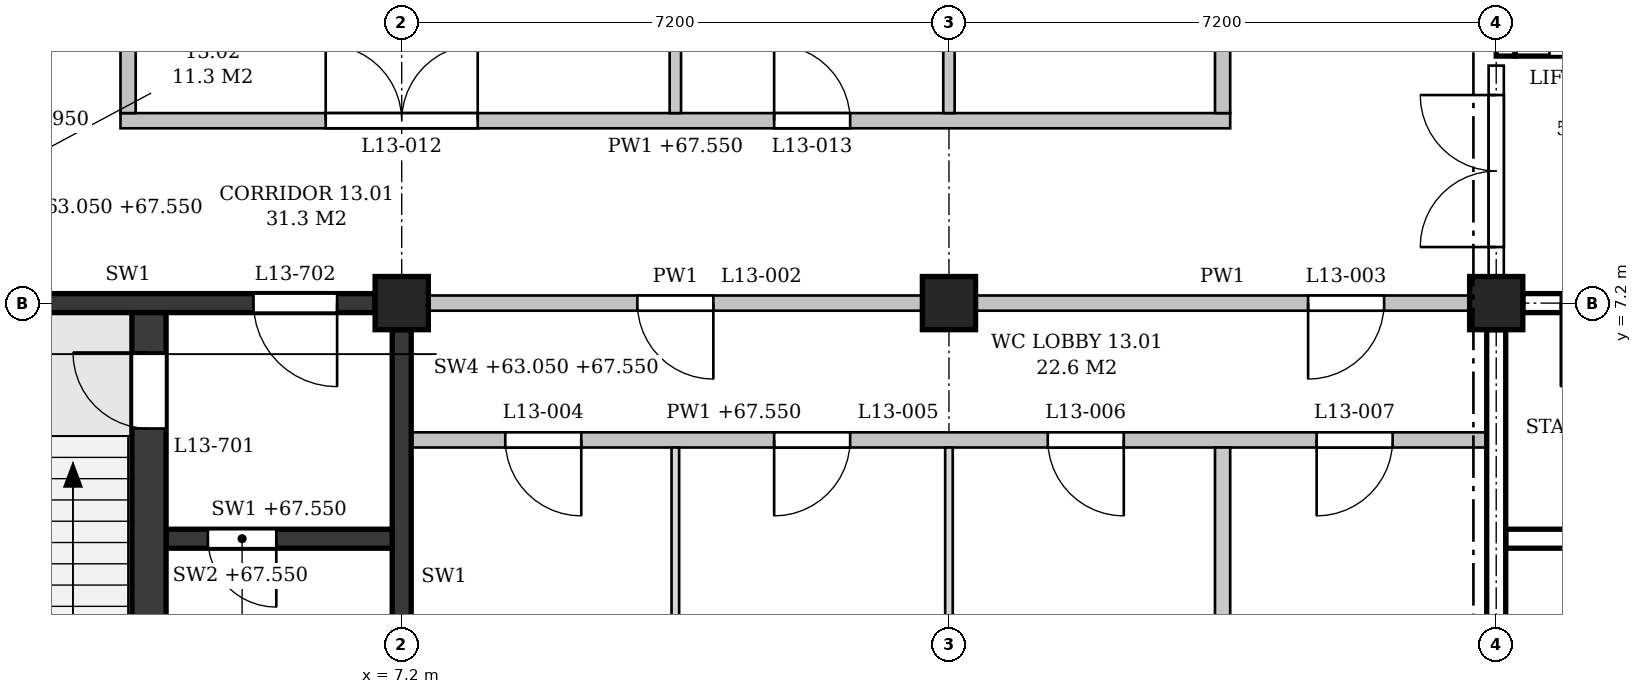
"""IFC4 building model, lengths in metres.
Left out: names, types, materials, properties, quantities, classifications, styles, units other than length and angle.
Written with IfcOpenShell. Run it as: python <this file> out.ifc"""

import sys

from ifc_helpers import new_model, si_unit, direction, frame, frame_2d, origin, origin_2d, place, context, subcontext, project, spatial, polyline, rectangle, outline, extrude, element, fill, save


model = new_model("IFC4")
c1 = context("Model", 3, precision=1e-05, world=origin(), true_north=direction((0.0, 1.0)))
c2 = subcontext(c1, "Body", "Model", "MODEL_VIEW")
j1 = project(units=[si_unit("LENGTHUNIT", "METRE"), si_unit("PLANEANGLEUNIT", "RADIAN")], contexts=[c1])
p1 = place(None, origin())
s1 = spatial("IfcSite", under=j1, at=p1, CompositionType="ELEMENT")
p2 = place(p1, origin())
s2 = spatial("IfcBuilding", under=s1, at=p2, CompositionType="ELEMENT")
p3 = place(p2, frame((0.0, 0.0, 63.3)))
s3 = spatial("IfcBuildingStorey", under=s2, at=p3, CompositionType="ELEMENT", Elevation=63.3)
for number, where, z_axis, x_axis in (
    (1, (7.2, 7.2, 0.0), (0.0, 0.0, 1.0), (1.0, 0.0, 0.0)),
    (2, (14.4, 7.2, 0.0), (0.0, 0.0, 1.0), (1.0, 0.0, 0.0)),
    (3, (21.6, 7.2, 0.0), (0.0, 0.0, 1.0), (1.0, 0.0, 0.0)),
):
    element("IfcColumn", number, at=place(p3, frame(where, z_axis=z_axis, x_axis=x_axis)), inside=s3, PredefinedType="COLUMN", context=c2, shape_type="SweptSolid", body=[
        extrude(rectangle(XDim=0.7, YDim=0.7, at=origin_2d()), origin(), (0.0, 0.0, 1.0), 4.5),
    ])
p4 = place(p3, frame((0.35, 7.2, 0.0), z_axis=(0.0, 0.0, 1.0), x_axis=(1.0, 0.0, 0.0)))
e4 = element("IfcWall", 4, at=p4, inside=s3, PredefinedType="SHEAR", context=c2, shape_type="SweptSolid", body=[
    extrude(rectangle(XDim=6.5, YDim=0.25, at=frame_2d((3.25, 0.0))), origin(), (0.0, 0.0, 1.0), 3.6),
])
p5 = place(p4, frame((4.9, 0.0, 0.0)))
e5 = element("IfcOpeningElement", 5, at=p5, cuts=e4, PredefinedType="OPENING", context=c2, shape_type="SweptSolid", body=[
    extrude(rectangle(XDim=1.1, YDim=2.1, at=frame_2d((0.55, 1.05))), frame((0.0, 0.135, 0.0), z_axis=(0.0, -1.0, 0.0), x_axis=(1.0, 0.0, 0.0)), (0.0, 0.0, 1.0), 0.27),
])
p6 = place(p3, frame((7.2, 0.35, 0.0), z_axis=(0.0, 0.0, 1.0), x_axis=(0.0, 1.0, 0.0)))
e6 = element("IfcWall", 6, at=p6, inside=s3, PredefinedType="SHEAR", context=c2, shape_type="SweptSolid", body=[
    extrude(rectangle(XDim=6.5, YDim=0.25, at=frame_2d((3.25, 0.0))), origin(), (0.0, 0.0, 1.0), 3.6),
])
p7 = place(p3, frame((3.875, 0.15, 0.0), z_axis=(0.0, 0.0, 1.0), x_axis=(0.0, 1.0, 0.0)))
e7 = element("IfcWall", 7, at=p7, inside=s3, PredefinedType="SHEAR", context=c2, shape_type="SweptSolid", body=[
    extrude(rectangle(XDim=6.925, YDim=0.45, at=frame_2d((3.462, 0.0))), origin(), (0.0, 0.0, 1.0), 4.25),
])
p8 = place(p7, frame((5.4, 0.0, 0.0)))
e8 = element("IfcOpeningElement", 8, at=p8, cuts=e7, PredefinedType="OPENING", context=c2, shape_type="SweptSolid", body=[
    extrude(rectangle(XDim=1.0, YDim=2.1, at=frame_2d((0.5, 1.05))), frame((0.0, 0.235, 0.0), z_axis=(0.0, -1.0, 0.0), x_axis=(1.0, 0.0, 0.0)), (0.0, 0.0, 1.0), 0.47),
])
p9 = place(p3, frame((4.1, 4.1, 0.0), z_axis=(0.0, 0.0, 1.0), x_axis=(1.0, 0.0, 0.0)))
e9 = element("IfcWall", 9, at=p9, inside=s3, PredefinedType="SHEAR", context=c2, shape_type="SweptSolid", body=[
    extrude(rectangle(XDim=2.975, YDim=0.25, at=frame_2d((1.487, 0.0))), origin(), (0.0, 0.0, 1.0), 4.25),
])
p10 = place(p9, frame((0.55, 0.0, 0.0)))
e10 = element("IfcOpeningElement", 10, at=p10, cuts=e9, PredefinedType="OPENING", context=c2, shape_type="SweptSolid", body=[
    extrude(rectangle(XDim=0.9, YDim=2.1, at=frame_2d((0.45, 1.05))), frame((0.0, 0.135, 0.0), z_axis=(0.0, -1.0, 0.0), x_axis=(1.0, 0.0, 0.0)), (0.0, 0.0, 1.0), 0.27),
])
p11 = place(p3, frame((21.95, 7.2, 0.0), z_axis=(0.0, 0.0, 1.0), x_axis=(1.0, 0.0, 0.0)))
e11 = element("IfcWall", 11, at=p11, inside=s3, PredefinedType="SHEAR", context=c2, shape_type="SweptSolid", body=[
    extrude(rectangle(XDim=6.5, YDim=0.25, at=frame_2d((3.25, 0.0))), origin(), (0.0, 0.0, 1.0), 3.6),
])
p12 = place(p11, frame((0.5, 0.0, 0.0)))
e12 = element("IfcOpeningElement", 12, at=p12, cuts=e11, PredefinedType="OPENING", context=c2, shape_type="SweptSolid", body=[
    extrude(rectangle(XDim=1.1, YDim=2.1, at=frame_2d((0.55, 1.05))), frame((0.0, 0.135, 0.0), z_axis=(0.0, -1.0, 0.0), x_axis=(1.0, 0.0, 0.0)), (0.0, 0.0, 1.0), 0.27),
])
p13 = place(p3, frame((21.6, 0.35, 0.0), z_axis=(0.0, 0.0, 1.0), x_axis=(0.0, 1.0, 0.0)))
e13 = element("IfcWall", 13, at=p13, inside=s3, PredefinedType="SHEAR", context=c2, shape_type="SweptSolid", body=[
    extrude(rectangle(XDim=6.5, YDim=0.25, at=frame_2d((3.25, 0.0))), origin(), (0.0, 0.0, 1.0), 3.6),
])
p14 = place(p3, frame((21.725, 4.1, 0.0), z_axis=(0.0, 0.0, 1.0), x_axis=(1.0, 0.0, 0.0)))
e14 = element("IfcWall", 14, at=p14, inside=s3, PredefinedType="SHEAR", context=c2, shape_type="SweptSolid", body=[
    extrude(rectangle(XDim=2.975, YDim=0.25, at=frame_2d((1.487, 0.0))), origin(), (0.0, 0.0, 1.0), 4.25),
])
p15 = place(p14, frame((1.525, 0.0, 0.0)))
e15 = element("IfcOpeningElement", 15, at=p15, cuts=e14, PredefinedType="OPENING", context=c2, shape_type="SweptSolid", body=[
    extrude(rectangle(XDim=0.9, YDim=2.1, at=frame_2d((0.45, 1.05))), frame((0.0, 0.135, 0.0), z_axis=(0.0, -1.0, 0.0), x_axis=(1.0, 0.0, 0.0)), (0.0, 0.0, 1.0), 0.27),
])
p16 = place(p3, frame((21.725, 10.45, -0.25), z_axis=(0.0, 0.0, 1.0), x_axis=(0.0, 1.0, 0.0)))
e16 = element("IfcWall", 16, at=p16, inside=s3, PredefinedType="SHEAR", context=c2, shape_type="SweptSolid", body=[
    extrude(rectangle(XDim=3.6, YDim=0.25, at=frame_2d((1.8, 0.0))), origin(), (0.0, 0.0, 1.0), 3.85),
])
p17 = place(p3, frame((21.85, 10.575, -0.25), z_axis=(0.0, 0.0, 1.0), x_axis=(1.0, 0.0, 0.0)))
e17 = element("IfcWall", 17, at=p17, inside=s3, PredefinedType="SHEAR", context=c2, shape_type="SweptSolid", body=[
    extrude(rectangle(XDim=2.0, YDim=0.25, at=frame_2d((1.0, 0.0))), origin(), (0.0, 0.0, 1.0), 4.5),
])
p18 = place(p17, frame((0.45, 0.0, 0.25)))
e18 = element("IfcOpeningElement", 18, at=p18, cuts=e17, PredefinedType="OPENING", context=c2, shape_type="SweptSolid", body=[
    extrude(rectangle(XDim=1.1, YDim=2.1, at=frame_2d((0.55, 1.05))), frame((0.0, 0.135, 0.0), z_axis=(0.0, -1.0, 0.0), x_axis=(1.0, 0.0, 0.0)), (0.0, 0.0, 1.0), 0.27),
])
p19 = place(p3, frame((7.325, 5.4, 0.0), z_axis=(0.0, 0.0, 1.0), x_axis=(1.0, 0.0, 0.0)))
e19 = element("IfcWall", 19, at=p19, inside=s3, PredefinedType="PARTITIONING", context=c2, shape_type="SweptSolid", body=[
    extrude(outline(polyline([(0.0, 0.0), (14.15, 0.0), (14.15, 3.6), (14.075, 3.6), (14.075, 4.25), (7.275, 4.25), (7.275, 3.6), (6.875, 3.6), (6.875, 4.25), (0.075, 4.25), (0.075, 3.6), (0.0, 3.6), (0.0, 0.0)])), frame((0.0, 0.1, 0.0), z_axis=(0.0, -1.0, 0.0), x_axis=(1.0, 0.0, 0.0)), (0.0, 0.0, 1.0), 0.2),
])
p20 = place(p19, frame((1.238, 0.0, 0.0)))
e20 = element("IfcOpeningElement", 20, at=p20, cuts=e19, PredefinedType="OPENING", context=c2, shape_type="SweptSolid", body=[
    extrude(rectangle(XDim=1.0, YDim=2.1, at=frame_2d((0.5, 1.05))), frame((0.0, 0.11, 0.0), z_axis=(0.0, -1.0, 0.0), x_axis=(1.0, 0.0, 0.0)), (0.0, 0.0, 1.0), 0.22),
])
p21 = place(p19, frame((4.775, 0.0, 0.0)))
e21 = element("IfcOpeningElement", 21, at=p21, cuts=e19, PredefinedType="OPENING", context=c2, shape_type="SweptSolid", body=[
    extrude(rectangle(XDim=1.0, YDim=2.1, at=frame_2d((0.5, 1.05))), frame((0.0, 0.11, 0.0), z_axis=(0.0, -1.0, 0.0), x_axis=(1.0, 0.0, 0.0)), (0.0, 0.0, 1.0), 0.22),
])
p22 = place(p19, frame((8.375, 0.0, 0.0)))
e22 = element("IfcOpeningElement", 22, at=p22, cuts=e19, PredefinedType="OPENING", context=c2, shape_type="SweptSolid", body=[
    extrude(rectangle(XDim=1.0, YDim=2.1, at=frame_2d((0.5, 1.05))), frame((0.0, 0.11, 0.0), z_axis=(0.0, -1.0, 0.0), x_axis=(1.0, 0.0, 0.0)), (0.0, 0.0, 1.0), 0.22),
])
p23 = place(p19, frame((11.913, 0.0, 0.0)))
e23 = element("IfcOpeningElement", 23, at=p23, cuts=e19, PredefinedType="OPENING", context=c2, shape_type="SweptSolid", body=[
    extrude(rectangle(XDim=1.0, YDim=2.1, at=frame_2d((0.5, 1.05))), frame((0.0, 0.11, 0.0), z_axis=(0.0, -1.0, 0.0), x_axis=(1.0, 0.0, 0.0)), (0.0, 0.0, 1.0), 0.22),
])
p24 = place(p3, frame((7.55, 7.2, 0.0), z_axis=(0.0, 0.0, 1.0), x_axis=(1.0, 0.0, 0.0)))
e24 = element("IfcWall", 24, at=p24, inside=s3, PredefinedType="PARTITIONING", context=c2, shape_type="SweptSolid", body=[
    extrude(rectangle(XDim=6.5, YDim=0.2, at=frame_2d((3.25, 0.0))), origin(), (0.0, 0.0, 1.0), 3.6),
])
p25 = place(p24, frame((2.75, 0.0, 0.0)))
e25 = element("IfcOpeningElement", 25, at=p25, cuts=e24, PredefinedType="OPENING", context=c2, shape_type="SweptSolid", body=[
    extrude(rectangle(XDim=1.0, YDim=2.1, at=frame_2d((0.5, 1.05))), frame((0.0, 0.11, 0.0), z_axis=(0.0, -1.0, 0.0), x_axis=(1.0, 0.0, 0.0)), (0.0, 0.0, 1.0), 0.22),
])
p26 = place(p3, frame((14.75, 7.2, 0.0), z_axis=(0.0, 0.0, 1.0), x_axis=(1.0, 0.0, 0.0)))
e26 = element("IfcWall", 26, at=p26, inside=s3, PredefinedType="PARTITIONING", context=c2, shape_type="SweptSolid", body=[
    extrude(rectangle(XDim=6.5, YDim=0.2, at=frame_2d((3.25, 0.0))), origin(), (0.0, 0.0, 1.0), 3.6),
])
p27 = place(p26, frame((4.375, 0.0, 0.0)))
e27 = element("IfcOpeningElement", 27, at=p27, cuts=e26, PredefinedType="OPENING", context=c2, shape_type="SweptSolid", body=[
    extrude(rectangle(XDim=1.0, YDim=2.1, at=frame_2d((0.5, 1.05))), frame((0.0, 0.11, 0.0), z_axis=(0.0, -1.0, 0.0), x_axis=(1.0, 0.0, 0.0)), (0.0, 0.0, 1.0), 0.22),
])
p28 = place(p3, frame((3.5, 9.6, 0.0), z_axis=(0.0, 0.0, 1.0), x_axis=(1.0, 0.0, 0.0)))
e28 = element("IfcWall", 28, at=p28, inside=s3, PredefinedType="PARTITIONING", context=c2, shape_type="SweptSolid", body=[
    extrude(outline(polyline([(0.0, 0.0), (14.6, 0.0), (14.6, 4.25), (11.1, 4.25), (11.1, 3.6), (10.7, 3.6), (10.7, 4.25), (3.9, 4.25), (3.9, 3.6), (3.5, 3.6), (3.5, 4.25), (0.0, 4.25), (0.0, 0.0)])), frame((0.0, 0.1, 0.0), z_axis=(0.0, -1.0, 0.0), x_axis=(1.0, 0.0, 0.0)), (0.0, 0.0, 1.0), 0.2),
])
p29 = place(p28, frame((2.7, 0.0, 0.0)))
e29 = element("IfcOpeningElement", 29, at=p29, cuts=e28, PredefinedType="OPENING", context=c2, shape_type="SweptSolid", body=[
    extrude(rectangle(XDim=2.0, YDim=2.1, at=frame_2d((1.0, 1.05))), frame((0.0, 0.11, 0.0), z_axis=(0.0, -1.0, 0.0), x_axis=(1.0, 0.0, 0.0)), (0.0, 0.0, 1.0), 0.22),
])
p30 = place(p28, frame((8.6, 0.0, 0.0)))
e30 = element("IfcOpeningElement", 30, at=p30, cuts=e28, PredefinedType="OPENING", context=c2, shape_type="SweptSolid", body=[
    extrude(rectangle(XDim=1.0, YDim=2.1, at=frame_2d((0.5, 1.05))), frame((0.0, 0.11, 0.0), z_axis=(0.0, -1.0, 0.0), x_axis=(1.0, 0.0, 0.0)), (0.0, 0.0, 1.0), 0.22),
])
p31 = place(p3, frame((3.6, 9.7, 0.0), z_axis=(0.0, 0.0, 1.0), x_axis=(0.0, 1.0, 0.0)))
e31 = element("IfcWall", 31, at=p31, inside=s3, PredefinedType="PARTITIONING", context=c2, shape_type="SweptSolid", body=[
    extrude(rectangle(XDim=1.1, YDim=0.2, at=frame_2d((0.55, 0.0))), origin(), (0.0, 0.0, 1.0), 4.25),
])
p32 = place(p3, frame((10.8, 0.15, 0.0), z_axis=(0.0, 0.0, 1.0), x_axis=(0.0, 1.0, 0.0)))
e32 = element("IfcWall", 32, at=p32, inside=s3, PredefinedType="PARTITIONING", context=c2, shape_type="SweptSolid", body=[
    extrude(rectangle(XDim=5.15, YDim=0.1, at=frame_2d((2.575, 0.0))), origin(), (0.0, 0.0, 1.0), 3.6),
])
p33 = place(p3, frame((10.8, 9.7, 0.0), z_axis=(0.0, 0.0, 1.0), x_axis=(0.0, 1.0, 0.0)))
e33 = element("IfcWall", 33, at=p33, inside=s3, PredefinedType="PARTITIONING", context=c2, shape_type="SweptSolid", body=[
    extrude(rectangle(XDim=4.55, YDim=0.15, at=frame_2d((2.275, 0.0))), origin(), (0.0, 0.0, 1.0), 3.6),
])
p34 = place(p3, frame((14.4, 0.35, 0.0), z_axis=(0.0, 0.0, 1.0), x_axis=(0.0, 1.0, 0.0)))
e34 = element("IfcWall", 34, at=p34, inside=s3, PredefinedType="PARTITIONING", context=c2, shape_type="SweptSolid", body=[
    extrude(rectangle(XDim=4.95, YDim=0.1, at=frame_2d((2.475, 0.0))), origin(), (0.0, 0.0, 1.0), 3.6),
])
p35 = place(p3, frame((14.4, 9.7, 0.0), z_axis=(0.0, 0.0, 1.0), x_axis=(0.0, 1.0, 0.0)))
e35 = element("IfcWall", 35, at=p35, inside=s3, PredefinedType="PARTITIONING", context=c2, shape_type="SweptSolid", body=[
    extrude(rectangle(XDim=4.35, YDim=0.15, at=frame_2d((2.175, 0.0))), origin(), (0.0, 0.0, 1.0), 3.6),
])
p36 = place(p3, frame((18.0, 0.15, 0.0), z_axis=(0.0, 0.0, 1.0), x_axis=(0.0, 1.0, 0.0)))
e36 = element("IfcWall", 36, at=p36, inside=s3, PredefinedType="PARTITIONING", context=c2, shape_type="SweptSolid", body=[
    extrude(outline(polyline([(0.0, 0.0), (5.15, 0.0), (5.15, 4.25), (0.05, 4.25), (0.05, 3.65), (0.0, 3.65), (0.0, 0.0)])), frame((0.0, 0.1, 0.0), z_axis=(0.0, -1.0, 0.0), x_axis=(1.0, 0.0, 0.0)), (0.0, 0.0, 1.0), 0.2),
])
p37 = place(p3, frame((18.0, 9.7, 0.0), z_axis=(0.0, 0.0, 1.0), x_axis=(0.0, 1.0, 0.0)))
e37 = element("IfcWall", 37, at=p37, inside=s3, PredefinedType="PARTITIONING", context=c2, shape_type="SweptSolid", body=[
    extrude(outline(polyline([(0.0, 0.0), (7.1, 0.0), (7.1, 4.25), (4.9, 4.25), (4.9, 3.65), (4.5, 3.65), (4.5, 4.25), (0.0, 4.25), (0.0, 0.0)])), frame((0.0, 0.1, 0.0), z_axis=(0.0, -1.0, 0.0), x_axis=(1.0, 0.0, 0.0)), (0.0, 0.0, 1.0), 0.2),
])
p38 = place(p37, frame((5.4, 0.0, 0.0)))
e38 = element("IfcOpeningElement", 38, at=p38, cuts=e37, PredefinedType="OPENING", context=c2, shape_type="SweptSolid", body=[
    extrude(rectangle(XDim=1.0, YDim=2.1, at=frame_2d((0.5, 1.05))), frame((0.0, 0.11, 0.0), z_axis=(0.0, -1.0, 0.0), x_axis=(1.0, 0.0, 0.0)), (0.0, 0.0, 1.0), 0.22),
])
p39 = place(p37, frame((1.85, 0.0, 0.0)))
e39 = element("IfcOpeningElement", 39, at=p39, cuts=e37, PredefinedType="OPENING", context=c2, shape_type="SweptSolid", body=[
    extrude(rectangle(XDim=1.0, YDim=2.1, at=frame_2d((0.5, 1.05))), frame((0.0, 0.11, 0.0), z_axis=(0.0, -1.0, 0.0), x_axis=(1.0, 0.0, 0.0)), (0.0, 0.0, 1.0), 0.22),
])
p40 = place(p3, frame((21.6, 7.55, 0.0), z_axis=(0.0, 0.0, 1.0), x_axis=(0.0, 1.0, 0.0)))
e40 = element("IfcWall", 40, at=p40, inside=s3, PredefinedType="PARTITIONING", context=c2, shape_type="SweptSolid", body=[
    extrude(rectangle(XDim=2.775, YDim=0.2, at=frame_2d((1.387, 0.0))), origin(), (0.0, 0.0, 1.0), 3.6),
])
p41 = place(p40, frame((0.387, 0.0, 0.0)))
e41 = element("IfcOpeningElement", 41, at=p41, cuts=e40, PredefinedType="OPENING", context=c2, shape_type="SweptSolid", body=[
    extrude(rectangle(XDim=2.0, YDim=2.4, at=frame_2d((1.0, 1.2))), frame((0.0, 0.11, 0.0), z_axis=(0.0, -1.0, 0.0), x_axis=(1.0, 0.0, 0.0)), (0.0, 0.0, 1.0), 0.22),
])
p42 = place(p8, origin())
e42 = element("IfcDoor", 42, at=p42, inside=s3, OperationType="SINGLE_SWING_RIGHT", PredefinedType="DOOR", context=c2, shape_type="SweptSolid", body=[
    extrude(rectangle(XDim=1.0, YDim=2.1, at=frame_2d((0.5, 1.05))), frame((0.0, 0.025, 0.0), z_axis=(0.0, -1.0, 0.0), x_axis=(1.0, 0.0, 0.0)), (0.0, 0.0, 1.0), 0.05),
])
fill(e8, e42)
p43 = place(p5, frame((1.1, 0.0, 0.0), z_axis=(0.0, 0.0, 1.0), x_axis=(-1.0, 0.0, 0.0)))
e43 = element("IfcDoor", 43, at=p43, inside=s3, OperationType="SINGLE_SWING_LEFT", PredefinedType="DOOR", context=c2, shape_type="SweptSolid", body=[
    extrude(rectangle(XDim=1.1, YDim=2.1, at=frame_2d((0.55, 1.05))), frame((0.0, 0.025, 0.0), z_axis=(0.0, -1.0, 0.0), x_axis=(1.0, 0.0, 0.0)), (0.0, 0.0, 1.0), 0.05),
])
fill(e5, e43)
p44 = place(p10, frame((0.9, 0.0, 0.0), z_axis=(0.0, 0.0, 1.0), x_axis=(-1.0, 0.0, 0.0)))
e44 = element("IfcDoor", 44, at=p44, inside=s3, OperationType="SINGLE_SWING_LEFT", PredefinedType="DOOR", context=c2, shape_type="SweptSolid", body=[
    extrude(rectangle(XDim=0.9, YDim=2.1, at=frame_2d((0.45, 1.05))), frame((0.0, 0.025, 0.0), z_axis=(0.0, -1.0, 0.0), x_axis=(1.0, 0.0, 0.0)), (0.0, 0.0, 1.0), 0.05),
])
fill(e10, e44)
p45 = place(p12, frame((1.1, 0.0, 0.0), z_axis=(0.0, 0.0, 1.0), x_axis=(-1.0, 0.0, 0.0)))
e45 = element("IfcDoor", 45, at=p45, inside=s3, OperationType="SINGLE_SWING_RIGHT", PredefinedType="DOOR", context=c2, shape_type="SweptSolid", body=[
    extrude(rectangle(XDim=1.1, YDim=2.1, at=frame_2d((0.55, 1.05))), frame((0.0, 0.025, 0.0), z_axis=(0.0, -1.0, 0.0), x_axis=(1.0, 0.0, 0.0)), (0.0, 0.0, 1.0), 0.05),
])
fill(e12, e45)
p46 = place(p41, origin())
e46 = element("IfcDoor", 46, at=p46, inside=s3, OperationType="DOUBLE_DOOR_SINGLE_SWING", PredefinedType="DOOR", context=c2, shape_type="SweptSolid", body=[
    extrude(rectangle(XDim=2.0, YDim=2.4, at=frame_2d((1.0, 1.2))), frame((0.0, 0.025, 0.0), z_axis=(0.0, -1.0, 0.0), x_axis=(1.0, 0.0, 0.0)), (0.0, 0.0, 1.0), 0.05),
])
fill(e41, e46)
p47 = place(p25, frame((1.0, 0.0, 0.0), z_axis=(0.0, 0.0, 1.0), x_axis=(-1.0, 0.0, 0.0)))
e47 = element("IfcDoor", 47, at=p47, inside=s3, OperationType="SINGLE_SWING_LEFT", PredefinedType="DOOR", context=c2, shape_type="SweptSolid", body=[
    extrude(rectangle(XDim=1.0, YDim=2.1, at=frame_2d((0.5, 1.05))), frame((0.0, 0.025, 0.0), z_axis=(0.0, -1.0, 0.0), x_axis=(1.0, 0.0, 0.0)), (0.0, 0.0, 1.0), 0.05),
])
fill(e25, e47)
p48 = place(p27, frame((1.0, 0.0, 0.0), z_axis=(0.0, 0.0, 1.0), x_axis=(-1.0, 0.0, 0.0)))
e48 = element("IfcDoor", 48, at=p48, inside=s3, OperationType="SINGLE_SWING_RIGHT", PredefinedType="DOOR", context=c2, shape_type="SweptSolid", body=[
    extrude(rectangle(XDim=1.0, YDim=2.1, at=frame_2d((0.5, 1.05))), frame((0.0, 0.025, 0.0), z_axis=(0.0, -1.0, 0.0), x_axis=(1.0, 0.0, 0.0)), (0.0, 0.0, 1.0), 0.05),
])
fill(e27, e48)
p49 = place(p20, frame((1.0, 0.0, 0.0), z_axis=(0.0, 0.0, 1.0), x_axis=(-1.0, 0.0, 0.0)))
e49 = element("IfcDoor", 49, at=p49, inside=s3, OperationType="SINGLE_SWING_LEFT", PredefinedType="DOOR", context=c2, shape_type="SweptSolid", body=[
    extrude(rectangle(XDim=1.0, YDim=2.1, at=frame_2d((0.5, 1.05))), frame((0.0, 0.025, 0.0), z_axis=(0.0, -1.0, 0.0), x_axis=(1.0, 0.0, 0.0)), (0.0, 0.0, 1.0), 0.05),
])
fill(e20, e49)
p50 = place(p21, frame((1.0, 0.0, 0.0), z_axis=(0.0, 0.0, 1.0), x_axis=(-1.0, 0.0, 0.0)))
e50 = element("IfcDoor", 50, at=p50, inside=s3, OperationType="SINGLE_SWING_RIGHT", PredefinedType="DOOR", context=c2, shape_type="SweptSolid", body=[
    extrude(rectangle(XDim=1.0, YDim=2.1, at=frame_2d((0.5, 1.05))), frame((0.0, 0.025, 0.0), z_axis=(0.0, -1.0, 0.0), x_axis=(1.0, 0.0, 0.0)), (0.0, 0.0, 1.0), 0.05),
])
fill(e21, e50)
p51 = place(p22, frame((1.0, 0.0, 0.0), z_axis=(0.0, 0.0, 1.0), x_axis=(-1.0, 0.0, 0.0)))
e51 = element("IfcDoor", 51, at=p51, inside=s3, OperationType="SINGLE_SWING_LEFT", PredefinedType="DOOR", context=c2, shape_type="SweptSolid", body=[
    extrude(rectangle(XDim=1.0, YDim=2.1, at=frame_2d((0.5, 1.05))), frame((0.0, 0.025, 0.0), z_axis=(0.0, -1.0, 0.0), x_axis=(1.0, 0.0, 0.0)), (0.0, 0.0, 1.0), 0.05),
])
fill(e22, e51)
p52 = place(p23, frame((1.0, 0.0, 0.0), z_axis=(0.0, 0.0, 1.0), x_axis=(-1.0, 0.0, 0.0)))
e52 = element("IfcDoor", 52, at=p52, inside=s3, OperationType="SINGLE_SWING_RIGHT", PredefinedType="DOOR", context=c2, shape_type="SweptSolid", body=[
    extrude(rectangle(XDim=1.0, YDim=2.1, at=frame_2d((0.5, 1.05))), frame((0.0, 0.025, 0.0), z_axis=(0.0, -1.0, 0.0), x_axis=(1.0, 0.0, 0.0)), (0.0, 0.0, 1.0), 0.05),
])
fill(e23, e52)
p53 = place(p29, origin())
e53 = element("IfcDoor", 53, at=p53, inside=s3, OperationType="DOUBLE_DOOR_SINGLE_SWING", PredefinedType="DOOR", context=c2, shape_type="SweptSolid", body=[
    extrude(rectangle(XDim=2.0, YDim=2.1, at=frame_2d((1.0, 1.05))), frame((0.0, 0.025, 0.0), z_axis=(0.0, -1.0, 0.0), x_axis=(1.0, 0.0, 0.0)), (0.0, 0.0, 1.0), 0.05),
])
fill(e29, e53)
p54 = place(p30, origin())
e54 = element("IfcDoor", 54, at=p54, inside=s3, OperationType="SINGLE_SWING_LEFT", PredefinedType="DOOR", context=c2, shape_type="SweptSolid", body=[
    extrude(rectangle(XDim=1.0, YDim=2.1, at=frame_2d((0.5, 1.05))), frame((0.0, 0.025, 0.0), z_axis=(0.0, -1.0, 0.0), x_axis=(1.0, 0.0, 0.0)), (0.0, 0.0, 1.0), 0.05),
])
fill(e30, e54)
save(model, sys.argv[1])
